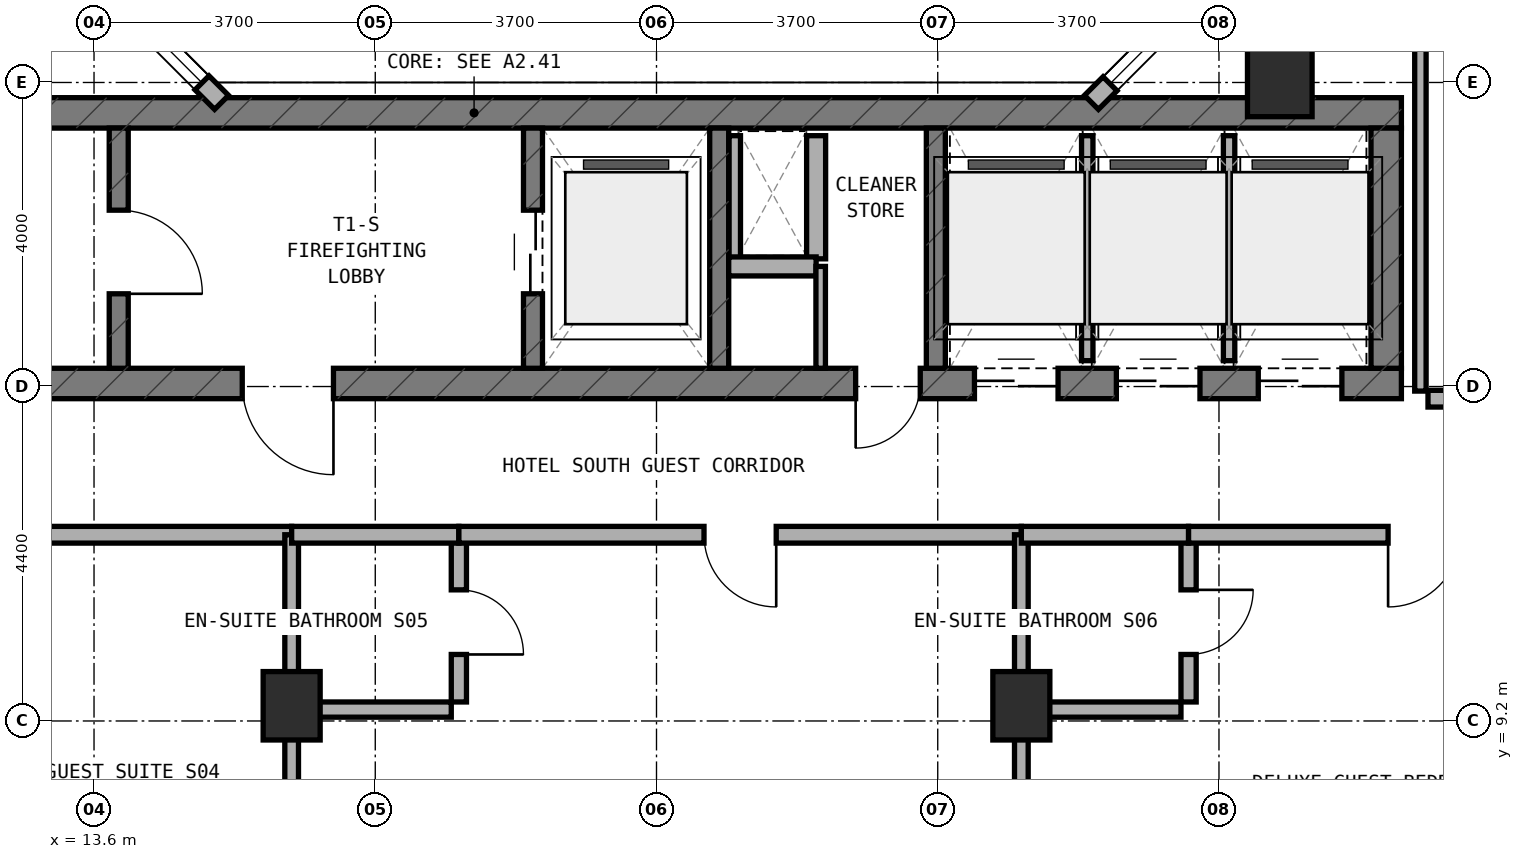
"""IFC4 building model, lengths in metres.
Left out: names, types, materials, properties, quantities, classifications, styles, units other than length and angle.
Written with IfcOpenShell. Run it as: python <this file> out.ifc"""

import sys

from ifc_helpers import new_model, si_unit, direction, frame, frame_2d, origin, origin_2d, place, context, subcontext, project, spatial, rectangle, extrude, element, fill, save


model = new_model("IFC4")
c1 = context("Model", 3, precision=1e-05, world=origin(), true_north=direction((0.0, 1.0)))
c2 = subcontext(c1, "Body", "Model", "MODEL_VIEW")
j1 = project(units=[si_unit("LENGTHUNIT", "METRE"), si_unit("PLANEANGLEUNIT", "RADIAN")], contexts=[c1])
p1 = place(None, origin())
s1 = spatial("IfcSite", under=j1, at=p1, CompositionType="ELEMENT")
p2 = place(p1, origin())
s2 = spatial("IfcBuilding", under=s1, at=p2, CompositionType="ELEMENT")
p3 = place(p2, frame((0.0, 0.0, 181.1)))
s3 = spatial("IfcBuildingStorey", under=s2, at=p3, CompositionType="ELEMENT", Elevation=181.1)
p4 = place(p3, frame((6.4, 13.64, 0.0), z_axis=(0.0, 0.0, 1.0), x_axis=(1.0, 0.0, 0.0)))
e1 = element("IfcWall", 1, at=p4, inside=s3, PredefinedType="SHEAR", context=c2, shape_type="SweptSolid", body=[
    extrude(rectangle(XDim=24.4, YDim=0.4, at=frame_2d((12.2, 0.0))), origin(), (0.0, 0.0, 1.0), 3.6),
])
p5 = place(p4, frame((9.15, 0.0, 0.0)))
e2 = element("IfcOpeningElement", 2, at=p5, cuts=e1, PredefinedType="OPENING", context=c2, shape_type="SweptSolid", body=[
    extrude(rectangle(XDim=1.2, YDim=2.15, at=frame_2d((0.6, 1.075))), frame((0.0, 0.21, 0.0), z_axis=(0.0, -1.0, 0.0), x_axis=(1.0, 0.0, 0.0)), (0.0, 0.0, 1.0), 0.42),
])
p6 = place(p4, frame((17.22, 0.0, 0.0)))
e3 = element("IfcOpeningElement", 3, at=p6, cuts=e1, PredefinedType="OPENING", context=c2, shape_type="SweptSolid", body=[
    extrude(rectangle(XDim=0.85, YDim=2.1, at=frame_2d((0.425, 1.05))), frame((0.0, 0.21, 0.0), z_axis=(0.0, -1.0, 0.0), x_axis=(1.0, 0.0, 0.0)), (0.0, 0.0, 1.0), 0.42),
])
p7 = place(p4, frame((18.783, 0.0, 0.0)))
e4 = element("IfcOpeningElement", 4, at=p7, cuts=e1, PredefinedType="OPENING", context=c2, shape_type="SweptSolid", body=[
    extrude(rectangle(XDim=1.1, YDim=2.15, at=frame_2d((0.55, 1.075))), frame((0.0, 0.21, 0.0), z_axis=(0.0, -1.0, 0.0), x_axis=(1.0, 0.0, 0.0)), (0.0, 0.0, 1.0), 0.42),
])
p8 = place(p4, frame((20.65, 0.0, 0.0)))
e5 = element("IfcOpeningElement", 5, at=p8, cuts=e1, PredefinedType="OPENING", context=c2, shape_type="SweptSolid", body=[
    extrude(rectangle(XDim=1.1, YDim=2.15, at=frame_2d((0.55, 1.075))), frame((0.0, 0.21, 0.0), z_axis=(0.0, -1.0, 0.0), x_axis=(1.0, 0.0, 0.0)), (0.0, 0.0, 1.0), 0.42),
])
p9 = place(p4, frame((22.517, 0.0, 0.0)))
e6 = element("IfcOpeningElement", 6, at=p9, cuts=e1, PredefinedType="OPENING", context=c2, shape_type="SweptSolid", body=[
    extrude(rectangle(XDim=1.1, YDim=2.15, at=frame_2d((0.55, 1.075))), frame((0.0, 0.21, 0.0), z_axis=(0.0, -1.0, 0.0), x_axis=(1.0, 0.0, 0.0)), (0.0, 0.0, 1.0), 0.42),
])
p10 = place(p3, frame((6.4, 17.2, 0.0), z_axis=(0.0, 0.0, 1.0), x_axis=(1.0, 0.0, 0.0)))
e7 = element("IfcWall", 7, at=p10, inside=s3, PredefinedType="SHEAR", context=c2, shape_type="SweptSolid", body=[
    extrude(rectangle(XDim=24.4, YDim=0.4, at=frame_2d((12.2, 0.0))), origin(), (0.0, 0.0, 1.0), 3.6),
])
p11 = place(p3, frame((30.6, 13.84, 0.0), z_axis=(0.0, 0.0, 1.0), x_axis=(0.0, 1.0, 0.0)))
e8 = element("IfcWall", 8, at=p11, inside=s3, PredefinedType="SHEAR", context=c2, shape_type="SweptSolid", body=[
    extrude(rectangle(XDim=3.16, YDim=0.4, at=frame_2d((1.58, 0.0))), origin(), (0.0, 0.0, 1.0), 3.6),
])
p12 = place(p3, frame((13.925, 13.84, 0.0), z_axis=(0.0, 0.0, 1.0), x_axis=(0.0, 1.0, 0.0)))
e9 = element("IfcWall", 9, at=p12, inside=s3, PredefinedType="STANDARD", context=c2, shape_type="SweptSolid", body=[
    extrude(rectangle(XDim=3.16, YDim=0.25, at=frame_2d((1.58, 0.0))), origin(), (0.0, 0.0, 1.0), 3.32),
])
p13 = place(p12, frame((0.98, 0.0, 0.0)))
e10 = element("IfcOpeningElement", 10, at=p13, cuts=e9, PredefinedType="OPENING", context=c2, shape_type="SweptSolid", body=[
    extrude(rectangle(XDim=1.1, YDim=2.15, at=frame_2d((0.55, 1.075))), frame((0.0, 0.135, 0.0), z_axis=(0.0, -1.0, 0.0), x_axis=(1.0, 0.0, 0.0)), (0.0, 0.0, 1.0), 0.27),
])
p14 = place(p3, frame((19.375, 13.84, 0.0), z_axis=(0.0, 0.0, 1.0), x_axis=(0.0, 1.0, 0.0)))
e11 = element("IfcWall", 11, at=p14, inside=s3, PredefinedType="STANDARD", context=c2, shape_type="SweptSolid", body=[
    extrude(rectangle(XDim=3.16, YDim=0.25, at=frame_2d((1.58, 0.0))), origin(), (0.0, 0.0, 1.0), 3.32),
])
p15 = place(p14, frame((0.98, 0.0, 0.0)))
e12 = element("IfcOpeningElement", 12, at=p15, cuts=e11, PredefinedType="OPENING", context=c2, shape_type="SweptSolid", body=[
    extrude(rectangle(XDim=1.1, YDim=2.15, at=frame_2d((0.55, 1.075))), frame((0.0, 0.135, 0.0), z_axis=(0.0, -1.0, 0.0), x_axis=(1.0, 0.0, 0.0)), (0.0, 0.0, 1.0), 0.27),
])
for number, where, z_axis, x_axis in (
    (13, (21.825, 13.84, 0.0), (0.0, 0.0, 1.0), (0.0, 1.0, 0.0)),
    (14, (24.675, 13.84, 0.0), (0.0, 0.0, 1.0), (0.0, 1.0, 0.0)),
):
    element("IfcWall", number, at=place(p3, frame(where, z_axis=z_axis, x_axis=x_axis)), inside=s3, PredefinedType="STANDARD", context=c2, shape_type="SweptSolid", body=[
        extrude(rectangle(XDim=3.16, YDim=0.25, at=frame_2d((1.58, 0.0))), origin(), (0.0, 0.0, 1.0), 3.32),
    ])
for number, where, z_axis, x_axis in (
    (15, (16.2, 9.4, 0.0), (0.0, 0.0, 1.0), (1.0, 0.0, 0.0)),
    (16, (25.8, 9.4, 0.0), (0.0, 0.0, 1.0), (1.0, 0.0, 0.0)),
):
    element("IfcColumn", number, at=place(p3, frame(where, z_axis=z_axis, x_axis=x_axis)), inside=s3, PredefinedType="COLUMN", context=c2, shape_type="SweptSolid", body=[
        extrude(rectangle(XDim=0.75, YDim=0.9, at=origin_2d()), origin(), (0.0, 0.0, 1.0), 3.6),
    ])
p16 = place(p3, frame((29.2, 17.65, 0.0), z_axis=(0.0, 0.0, 1.0), x_axis=(1.0, 0.0, 0.0)))
e17 = element("IfcColumn", 17, at=p16, inside=s3, PredefinedType="COLUMN", context=c2, shape_type="SweptSolid", body=[
    extrude(rectangle(XDim=0.85, YDim=1.0, at=origin_2d()), origin(), (0.0, 0.0, 1.0), 3.6),
])
p17 = place(p3, frame((28.485, 19.101, 0.0), z_axis=(0.0, 0.0, 1.0), x_axis=(-0.707106781187, -0.707106781187, 0.0)))
e18 = element("IfcWall", 18, at=p17, inside=s3, PredefinedType="STANDARD", context=c2, shape_type="SweptSolid", body=[
    extrude(rectangle(XDim=2.493, YDim=0.26, at=frame_2d((1.247, 0.0))), origin(), (0.0, 0.0, 1.0), 3.32),
])
p18 = place(p17, frame((0.347, 0.0, 0.85)))
e19 = element("IfcOpeningElement", 19, at=p18, cuts=e18, PredefinedType="OPENING", context=c2, shape_type="SweptSolid", body=[
    extrude(rectangle(XDim=1.8, YDim=1.5, at=frame_2d((0.9, 0.75))), frame((0.0, 0.14, 0.0), z_axis=(0.0, -1.0, 0.0), x_axis=(1.0, 0.0, 0.0)), (0.0, 0.0, 1.0), 0.28),
])
p19 = place(p3, frame((15.278, 17.338, 0.0), z_axis=(0.0, 0.0, 1.0), x_axis=(-0.707106781187, 0.707106781187, 0.0)))
e20 = element("IfcWall", 20, at=p19, inside=s3, PredefinedType="STANDARD", context=c2, shape_type="SweptSolid", body=[
    extrude(rectangle(XDim=2.529, YDim=0.26, at=frame_2d((1.264, 0.0))), origin(), (0.0, 0.0, 1.0), 3.32),
])
p20 = place(p19, frame((0.364, 0.0, 0.85)))
e21 = element("IfcOpeningElement", 21, at=p20, cuts=e20, PredefinedType="OPENING", context=c2, shape_type="SweptSolid", body=[
    extrude(rectangle(XDim=1.8, YDim=1.5, at=frame_2d((0.9, 0.75))), frame((0.0, 0.14, 0.0), z_axis=(0.0, -1.0, 0.0), x_axis=(1.0, 0.0, 0.0)), (0.0, 0.0, 1.0), 0.28),
])
p21 = place(p3, frame((22.03, 15.28, 0.0), z_axis=(0.0, 0.0, 1.0), x_axis=(0.0, 1.0, 0.0)))
e22 = element("IfcWall", 22, at=p21, inside=s3, PredefinedType="PARTITIONING", context=c2, shape_type="SweptSolid", body=[
    extrude(rectangle(XDim=1.62, YDim=0.15, at=frame_2d((0.81, 0.0))), origin(), (0.0, 0.0, 1.0), 3.32),
])
p22 = place(p3, frame((23.1, 15.28, 0.0), z_axis=(0.0, 0.0, 1.0), x_axis=(0.0, 1.0, 0.0)))
e23 = element("IfcWall", 23, at=p22, inside=s3, PredefinedType="SOLIDWALL", context=c2, shape_type="SweptSolid", body=[
    extrude(rectangle(XDim=1.62, YDim=0.25, at=frame_2d((0.81, 0.0))), origin(), (0.0, 0.0, 1.0), 3.32),
])
p23 = place(p3, frame((21.95, 15.18, 0.0), z_axis=(0.0, 0.0, 1.0), x_axis=(1.0, 0.0, 0.0)))
e24 = element("IfcWall", 24, at=p23, inside=s3, PredefinedType="SOLIDWALL", context=c2, shape_type="SweptSolid", body=[
    extrude(rectangle(XDim=1.15, YDim=0.25, at=frame_2d((0.575, 0.0))), origin(), (0.0, 0.0, 1.0), 3.32),
])
p24 = place(p3, frame((23.16, 13.84, 0.0), z_axis=(0.0, 0.0, 1.0), x_axis=(0.0, 1.0, 0.0)))
e25 = element("IfcWall", 25, at=p24, inside=s3, PredefinedType="PARTITIONING", context=c2, shape_type="SweptSolid", body=[
    extrude(rectangle(XDim=1.34, YDim=0.125, at=frame_2d((0.67, 0.0))), origin(), (0.0, 0.0, 1.0), 3.32),
])
p25 = place(p3, frame((26.667, 13.94, 0.0), z_axis=(0.0, 0.0, 1.0), x_axis=(0.0, 1.0, 0.0)))
e26 = element("IfcWall", 26, at=p25, inside=s3, PredefinedType="PARTITIONING", context=c2, shape_type="SweptSolid", body=[
    extrude(rectangle(XDim=2.96, YDim=0.15, at=frame_2d((1.48, 0.0))), origin(), (0.0, 0.0, 1.0), 3.32),
])
p26 = place(p3, frame((28.533, 13.94, 0.0), z_axis=(0.0, 0.0, 1.0), x_axis=(0.0, 1.0, 0.0)))
e27 = element("IfcWall", 27, at=p26, inside=s3, PredefinedType="PARTITIONING", context=c2, shape_type="SweptSolid", body=[
    extrude(rectangle(XDim=2.96, YDim=0.15, at=frame_2d((1.48, 0.0))), origin(), (0.0, 0.0, 1.0), 2.995),
])
p27 = place(p3, frame((5.55, 11.65, 0.0), z_axis=(0.0, 0.0, 1.0), x_axis=(1.0, 0.0, 0.0)))
e28 = element("IfcWall", 28, at=p27, inside=s3, PredefinedType="SOLIDWALL", context=c2, shape_type="SweptSolid", body=[
    extrude(rectangle(XDim=10.65, YDim=0.22, at=frame_2d((5.325, 0.0))), origin(), (0.0, 0.0, 1.0), 2.995),
])
p28 = place(p27, frame((4.85, 0.0, 0.0)))
e29 = element("IfcOpeningElement", 29, at=p28, cuts=e28, PredefinedType="OPENING", context=c2, shape_type="SweptSolid", body=[
    extrude(rectangle(XDim=0.95, YDim=2.1, at=frame_2d((0.475, 1.05))), frame((0.0, 0.12, 0.0), z_axis=(0.0, -1.0, 0.0), x_axis=(1.0, 0.0, 0.0)), (0.0, 0.0, 1.0), 0.24),
])
p29 = place(p3, frame((16.2, 5.46, 0.0), z_axis=(0.0, 0.0, 1.0), x_axis=(0.0, 1.0, 0.0)))
e30 = element("IfcWall", 30, at=p29, inside=s3, PredefinedType="SOLIDWALL", context=c2, shape_type="SweptSolid", body=[
    extrude(rectangle(XDim=6.19, YDim=0.18, at=frame_2d((3.095, 0.0))), origin(), (0.0, 0.0, 1.0), 2.935),
])
p30 = place(p3, frame((18.4, 9.45, 0.0), z_axis=(0.0, 0.0, 1.0), x_axis=(0.0, 1.0, 0.0)))
e31 = element("IfcWall", 31, at=p30, inside=s3, PredefinedType="PLUMBINGWALL", context=c2, shape_type="SweptSolid", body=[
    extrude(rectangle(XDim=2.1, YDim=0.2, at=frame_2d((1.05, 0.0))), origin(), (0.0, 0.0, 1.0), 2.895),
])
p31 = place(p30, frame((0.625, 0.0, 0.0)))
e32 = element("IfcOpeningElement", 32, at=p31, cuts=e31, PredefinedType="OPENING", context=c2, shape_type="SweptSolid", body=[
    extrude(rectangle(XDim=0.85, YDim=2.1, at=frame_2d((0.425, 1.05))), frame((0.0, 0.11, 0.0), z_axis=(0.0, -1.0, 0.0), x_axis=(1.0, 0.0, 0.0)), (0.0, 0.0, 1.0), 0.22),
])
p32 = place(p3, frame((16.3, 9.35, 0.0), z_axis=(0.0, 0.0, 1.0), x_axis=(1.0, 0.0, 0.0)))
e33 = element("IfcWall", 33, at=p32, inside=s3, PredefinedType="PLUMBINGWALL", context=c2, shape_type="SweptSolid", body=[
    extrude(rectangle(XDim=2.0, YDim=0.2, at=frame_2d((1.0, 0.0))), origin(), (0.0, 0.0, 1.0), 2.935),
])
p33 = place(p3, frame((16.2, 11.65, 0.0), z_axis=(0.0, 0.0, 1.0), x_axis=(1.0, 0.0, 0.0)))
e34 = element("IfcWall", 34, at=p33, inside=s3, PredefinedType="SOLIDWALL", context=c2, shape_type="SweptSolid", body=[
    extrude(rectangle(XDim=2.2, YDim=0.22, at=frame_2d((1.1, 0.0))), origin(), (0.0, 0.0, 1.0), 2.995),
])
p34 = place(p3, frame((18.4, 11.65, 0.0), z_axis=(0.0, 0.0, 1.0), x_axis=(1.0, 0.0, 0.0)))
e35 = element("IfcWall", 35, at=p34, inside=s3, PredefinedType="SOLIDWALL", context=c2, shape_type="SweptSolid", body=[
    extrude(rectangle(XDim=7.4, YDim=0.22, at=frame_2d((3.7, 0.0))), origin(), (0.0, 0.0, 1.0), 2.995),
])
p35 = place(p34, frame((3.225, 0.0, 0.0)))
e36 = element("IfcOpeningElement", 36, at=p35, cuts=e35, PredefinedType="OPENING", context=c2, shape_type="SweptSolid", body=[
    extrude(rectangle(XDim=0.95, YDim=2.1, at=frame_2d((0.475, 1.05))), frame((0.0, 0.12, 0.0), z_axis=(0.0, -1.0, 0.0), x_axis=(1.0, 0.0, 0.0)), (0.0, 0.0, 1.0), 0.24),
])
p36 = place(p3, frame((25.8, 5.46, 0.0), z_axis=(0.0, 0.0, 1.0), x_axis=(0.0, 1.0, 0.0)))
e37 = element("IfcWall", 37, at=p36, inside=s3, PredefinedType="SOLIDWALL", context=c2, shape_type="SweptSolid", body=[
    extrude(rectangle(XDim=6.19, YDim=0.18, at=frame_2d((3.095, 0.0))), origin(), (0.0, 0.0, 1.0), 2.935),
])
p37 = place(p3, frame((28.0, 9.45, 0.0), z_axis=(0.0, 0.0, 1.0), x_axis=(0.0, 1.0, 0.0)))
e38 = element("IfcWall", 38, at=p37, inside=s3, PredefinedType="PLUMBINGWALL", context=c2, shape_type="SweptSolid", body=[
    extrude(rectangle(XDim=2.1, YDim=0.2, at=frame_2d((1.05, 0.0))), origin(), (0.0, 0.0, 1.0), 2.895),
])
p38 = place(p37, frame((0.625, 0.0, 0.0)))
e39 = element("IfcOpeningElement", 39, at=p38, cuts=e38, PredefinedType="OPENING", context=c2, shape_type="SweptSolid", body=[
    extrude(rectangle(XDim=0.85, YDim=2.1, at=frame_2d((0.425, 1.05))), frame((0.0, 0.11, 0.0), z_axis=(0.0, -1.0, 0.0), x_axis=(1.0, 0.0, 0.0)), (0.0, 0.0, 1.0), 0.22),
])
p39 = place(p3, frame((25.9, 9.35, 0.0), z_axis=(0.0, 0.0, 1.0), x_axis=(1.0, 0.0, 0.0)))
e40 = element("IfcWall", 40, at=p39, inside=s3, PredefinedType="PLUMBINGWALL", context=c2, shape_type="SweptSolid", body=[
    extrude(rectangle(XDim=2.0, YDim=0.2, at=frame_2d((1.0, 0.0))), origin(), (0.0, 0.0, 1.0), 2.935),
])
p40 = place(p3, frame((25.8, 11.65, 0.0), z_axis=(0.0, 0.0, 1.0), x_axis=(1.0, 0.0, 0.0)))
e41 = element("IfcWall", 41, at=p40, inside=s3, PredefinedType="SOLIDWALL", context=c2, shape_type="SweptSolid", body=[
    extrude(rectangle(XDim=2.2, YDim=0.22, at=frame_2d((1.1, 0.0))), origin(), (0.0, 0.0, 1.0), 2.995),
])
p41 = place(p3, frame((28.0, 11.65, 0.0), z_axis=(0.0, 0.0, 1.0), x_axis=(1.0, 0.0, 0.0)))
e42 = element("IfcWall", 42, at=p41, inside=s3, PredefinedType="SOLIDWALL", context=c2, shape_type="SweptSolid", body=[
    extrude(rectangle(XDim=6.2, YDim=0.22, at=frame_2d((3.1, 0.0))), origin(), (0.0, 0.0, 1.0), 2.995),
])
p42 = place(p41, frame((2.625, 0.0, 0.0)))
e43 = element("IfcOpeningElement", 43, at=p42, cuts=e42, PredefinedType="OPENING", context=c2, shape_type="SweptSolid", body=[
    extrude(rectangle(XDim=0.95, YDim=2.1, at=frame_2d((0.475, 1.05))), frame((0.0, 0.12, 0.0), z_axis=(0.0, -1.0, 0.0), x_axis=(1.0, 0.0, 0.0)), (0.0, 0.0, 1.0), 0.24),
])
p43 = place(p3, frame((31.05, 13.54, 0.0), z_axis=(0.0, 0.0, 1.0), x_axis=(0.0, 1.0, 0.0)))
e44 = element("IfcWall", 44, at=p43, inside=s3, PredefinedType="PARTITIONING", context=c2, shape_type="SweptSolid", body=[
    extrude(rectangle(XDim=6.66, YDim=0.15, at=frame_2d((3.33, 0.0))), origin(), (0.0, 0.0, 1.0), 2.995),
])
p44 = place(p3, frame((31.15, 13.44, 0.0), z_axis=(0.0, 0.0, 1.0), x_axis=(1.0, 0.0, 0.0)))
e45 = element("IfcWall", 45, at=p44, inside=s3, PredefinedType="SOLIDWALL", context=c2, shape_type="SweptSolid", body=[
    extrude(rectangle(XDim=9.15, YDim=0.22, at=frame_2d((4.575, 0.0))), origin(), (0.0, 0.0, 1.0), 2.935),
])
p45 = place(p44, frame((3.612, 0.0, 0.0)))
e46 = element("IfcOpeningElement", 46, at=p45, cuts=e45, PredefinedType="OPENING", context=c2, shape_type="SweptSolid", body=[
    extrude(rectangle(XDim=1.1, YDim=2.1, at=frame_2d((0.55, 1.05))), frame((0.0, 0.12, 0.0), z_axis=(0.0, -1.0, 0.0), x_axis=(1.0, 0.0, 0.0)), (0.0, 0.0, 1.0), 0.24),
])
p46 = place(p18, origin())
e47 = element("IfcWindow", 47, at=p46, inside=s3, PartitioningType="SINGLE_PANEL", PredefinedType="WINDOW", context=c2, shape_type="SweptSolid", body=[
    extrude(rectangle(XDim=1.8, YDim=1.5, at=frame_2d((0.9, 0.75))), frame((0.0, 0.03, 0.0), z_axis=(0.0, -1.0, 0.0), x_axis=(1.0, 0.0, 0.0)), (0.0, 0.0, 1.0), 0.06),
])
fill(e19, e47)
p47 = place(p20, origin())
e48 = element("IfcWindow", 48, at=p47, inside=s3, PartitioningType="SINGLE_PANEL", PredefinedType="WINDOW", context=c2, shape_type="SweptSolid", body=[
    extrude(rectangle(XDim=1.8, YDim=1.5, at=frame_2d((0.9, 0.75))), frame((0.0, 0.03, 0.0), z_axis=(0.0, -1.0, 0.0), x_axis=(1.0, 0.0, 0.0)), (0.0, 0.0, 1.0), 0.06),
])
fill(e21, e48)
p48 = place(p13, frame((1.1, 0.0, 0.0), z_axis=(0.0, 0.0, 1.0), x_axis=(-1.0, 0.0, 0.0)))
e49 = element("IfcDoor", 49, at=p48, inside=s3, OperationType="SINGLE_SWING_RIGHT", PredefinedType="DOOR", context=c2, shape_type="SweptSolid", body=[
    extrude(rectangle(XDim=1.1, YDim=2.15, at=frame_2d((0.55, 1.075))), frame((0.0, 0.025, 0.0), z_axis=(0.0, -1.0, 0.0), x_axis=(1.0, 0.0, 0.0)), (0.0, 0.0, 1.0), 0.05),
])
fill(e10, e49)
p49 = place(p5, frame((1.2, 0.0, 0.0), z_axis=(0.0, 0.0, 1.0), x_axis=(-1.0, 0.0, 0.0)))
e50 = element("IfcDoor", 50, at=p49, inside=s3, OperationType="SINGLE_SWING_LEFT", PredefinedType="DOOR", context=c2, shape_type="SweptSolid", body=[
    extrude(rectangle(XDim=1.2, YDim=2.15, at=frame_2d((0.6, 1.075))), frame((0.0, 0.025, 0.0), z_axis=(0.0, -1.0, 0.0), x_axis=(1.0, 0.0, 0.0)), (0.0, 0.0, 1.0), 0.05),
])
fill(e2, e50)
p50 = place(p15, origin())
e51 = element("IfcDoor", 51, at=p50, inside=s3, OperationType="DOUBLE_DOOR_SLIDING", PredefinedType="DOOR", context=c2, shape_type="SweptSolid", body=[
    extrude(rectangle(XDim=1.1, YDim=2.15, at=frame_2d((0.55, 1.075))), frame((0.0, 0.025, 0.0), z_axis=(0.0, -1.0, 0.0), x_axis=(1.0, 0.0, 0.0)), (0.0, 0.0, 1.0), 0.05),
])
fill(e12, e51)
p51 = place(p6, frame((0.85, 0.0, 0.0), z_axis=(0.0, 0.0, 1.0), x_axis=(-1.0, 0.0, 0.0)))
e52 = element("IfcDoor", 52, at=p51, inside=s3, OperationType="SINGLE_SWING_RIGHT", PredefinedType="DOOR", context=c2, shape_type="SweptSolid", body=[
    extrude(rectangle(XDim=0.85, YDim=2.1, at=frame_2d((0.425, 1.05))), frame((0.0, 0.025, 0.0), z_axis=(0.0, -1.0, 0.0), x_axis=(1.0, 0.0, 0.0)), (0.0, 0.0, 1.0), 0.05),
])
fill(e3, e52)
p52 = place(p7, frame((1.1, 0.0, 0.0), z_axis=(0.0, 0.0, 1.0), x_axis=(-1.0, 0.0, 0.0)))
e53 = element("IfcDoor", 53, at=p52, inside=s3, OperationType="DOUBLE_DOOR_SLIDING", PredefinedType="DOOR", context=c2, shape_type="SweptSolid", body=[
    extrude(rectangle(XDim=1.1, YDim=2.15, at=frame_2d((0.55, 1.075))), frame((0.0, 0.025, 0.0), z_axis=(0.0, -1.0, 0.0), x_axis=(1.0, 0.0, 0.0)), (0.0, 0.0, 1.0), 0.05),
])
fill(e4, e53)
p53 = place(p8, frame((1.1, 0.0, 0.0), z_axis=(0.0, 0.0, 1.0), x_axis=(-1.0, 0.0, 0.0)))
e54 = element("IfcDoor", 54, at=p53, inside=s3, OperationType="DOUBLE_DOOR_SLIDING", PredefinedType="DOOR", context=c2, shape_type="SweptSolid", body=[
    extrude(rectangle(XDim=1.1, YDim=2.15, at=frame_2d((0.55, 1.075))), frame((0.0, 0.025, 0.0), z_axis=(0.0, -1.0, 0.0), x_axis=(1.0, 0.0, 0.0)), (0.0, 0.0, 1.0), 0.05),
])
fill(e5, e54)
p54 = place(p9, frame((1.1, 0.0, 0.0), z_axis=(0.0, 0.0, 1.0), x_axis=(-1.0, 0.0, 0.0)))
e55 = element("IfcDoor", 55, at=p54, inside=s3, OperationType="DOUBLE_DOOR_SLIDING", PredefinedType="DOOR", context=c2, shape_type="SweptSolid", body=[
    extrude(rectangle(XDim=1.1, YDim=2.15, at=frame_2d((0.55, 1.075))), frame((0.0, 0.025, 0.0), z_axis=(0.0, -1.0, 0.0), x_axis=(1.0, 0.0, 0.0)), (0.0, 0.0, 1.0), 0.05),
])
fill(e6, e55)
p55 = place(p31, frame((0.85, 0.0, 0.0), z_axis=(0.0, 0.0, 1.0), x_axis=(-1.0, 0.0, 0.0)))
e56 = element("IfcDoor", 56, at=p55, inside=s3, OperationType="SINGLE_SWING_RIGHT", PredefinedType="DOOR", context=c2, shape_type="SweptSolid", body=[
    extrude(rectangle(XDim=0.85, YDim=2.1, at=frame_2d((0.425, 1.05))), frame((0.0, 0.025, 0.0), z_axis=(0.0, -1.0, 0.0), x_axis=(1.0, 0.0, 0.0)), (0.0, 0.0, 1.0), 0.05),
])
fill(e32, e56)
p56 = place(p35, frame((0.95, 0.0, 0.0), z_axis=(0.0, 0.0, 1.0), x_axis=(-1.0, 0.0, 0.0)))
e57 = element("IfcDoor", 57, at=p56, inside=s3, OperationType="SINGLE_SWING_LEFT", PredefinedType="DOOR", context=c2, shape_type="SweptSolid", body=[
    extrude(rectangle(XDim=0.95, YDim=2.1, at=frame_2d((0.475, 1.05))), frame((0.0, 0.025, 0.0), z_axis=(0.0, -1.0, 0.0), x_axis=(1.0, 0.0, 0.0)), (0.0, 0.0, 1.0), 0.05),
])
fill(e36, e57)
p57 = place(p38, frame((0.85, 0.0, 0.0), z_axis=(0.0, 0.0, 1.0), x_axis=(-1.0, 0.0, 0.0)))
e58 = element("IfcDoor", 58, at=p57, inside=s3, OperationType="SINGLE_SWING_LEFT", PredefinedType="DOOR", context=c2, shape_type="SweptSolid", body=[
    extrude(rectangle(XDim=0.85, YDim=2.1, at=frame_2d((0.425, 1.05))), frame((0.0, 0.025, 0.0), z_axis=(0.0, -1.0, 0.0), x_axis=(1.0, 0.0, 0.0)), (0.0, 0.0, 1.0), 0.05),
])
fill(e39, e58)
p58 = place(p42, frame((0.95, 0.0, 0.0), z_axis=(0.0, 0.0, 1.0), x_axis=(-1.0, 0.0, 0.0)))
e59 = element("IfcDoor", 59, at=p58, inside=s3, OperationType="SINGLE_SWING_RIGHT", PredefinedType="DOOR", context=c2, shape_type="SweptSolid", body=[
    extrude(rectangle(XDim=0.95, YDim=2.1, at=frame_2d((0.475, 1.05))), frame((0.0, 0.025, 0.0), z_axis=(0.0, -1.0, 0.0), x_axis=(1.0, 0.0, 0.0)), (0.0, 0.0, 1.0), 0.05),
])
fill(e43, e59)
save(model, sys.argv[1])
